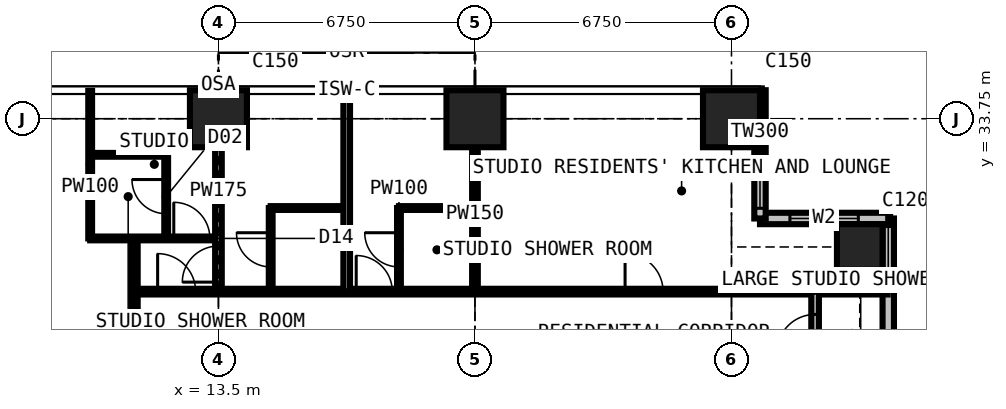
"""IFC4 building model, lengths in metres.
Left out: names, types, materials, properties, quantities, classifications, styles, units other than length and angle.
Written with IfcOpenShell. Run it as: python <this file> out.ifc"""

import sys

from ifc_helpers import new_model, si_unit, direction, frame, frame_2d, origin, origin_2d, place, context, subcontext, project, spatial, rectangle, extrude, element, fill, save


model = new_model("IFC4")
c1 = context("Model", 3, precision=1e-05, world=origin(), true_north=direction((0.0, 1.0)))
c2 = subcontext(c1, "Body", "Model", "MODEL_VIEW")
j1 = project(units=[si_unit("LENGTHUNIT", "METRE"), si_unit("PLANEANGLEUNIT", "RADIAN")], contexts=[c1])
p1 = place(None, origin())
s1 = spatial("IfcSite", under=j1, at=p1, CompositionType="ELEMENT")
p2 = place(p1, origin())
s2 = spatial("IfcBuilding", under=s1, at=p2, CompositionType="ELEMENT")
p3 = place(p2, frame((0.0, 0.0, 153.0)))
s3 = spatial("IfcBuildingStorey", under=s2, at=p3, CompositionType="ELEMENT", Elevation=153.0)
for number, where, z_axis, x_axis in (
    (1, (13.5, 33.75, 0.0), (0.0, 0.0, 1.0), (1.0, 0.0, 0.0)),
    (2, (20.25, 33.75, 0.0), (0.0, 0.0, 1.0), (1.0, 0.0, 0.0)),
    (3, (27.0, 33.75, 0.0), (0.0, 0.0, 1.0), (1.0, 0.0, 0.0)),
):
    element("IfcColumn", number, at=place(p3, frame(where, z_axis=z_axis, x_axis=x_axis)), inside=s3, PredefinedType="COLUMN", context=c2, shape_type="SweptSolid", body=[
        extrude(rectangle(XDim=1.5, YDim=1.5, at=origin_2d()), origin(), (0.0, 0.0, 1.0), 3.6),
    ])
p4 = place(p3, frame((30.375, 30.375, 0.0), z_axis=(0.0, 0.0, 1.0), x_axis=(1.0, 0.0, 0.0)))
e4 = element("IfcColumn", 4, at=p4, inside=s3, PredefinedType="COLUMN", context=c2, shape_type="SweptSolid", body=[
    extrude(rectangle(XDim=1.2, YDim=1.2, at=origin_2d()), origin(), (0.0, 0.0, 1.0), 3.6),
])
p5 = place(p3, frame((31.125, 27.75, 0.0), z_axis=(0.0, 0.0, 1.0), x_axis=(0.0, 1.0, 0.0)))
e5 = element("IfcWall", 5, at=p5, inside=s3, PredefinedType="SOLIDWALL", context=c2, shape_type="SweptSolid", body=[
    extrude(rectangle(XDim=3.375, YDim=0.3, at=frame_2d((1.688, 0.0))), origin(), (0.0, 0.0, 1.0), 3.375),
])
p6 = place(p5, frame((1.663, 0.0, 0.9)))
e6 = element("IfcOpeningElement", 6, at=p6, cuts=e5, PredefinedType="OPENING", context=c2, shape_type="SweptSolid", body=[
    extrude(rectangle(XDim=1.5, YDim=1.8, at=frame_2d((0.75, 0.9))), frame((0.0, 0.16, 0.0), z_axis=(0.0, -1.0, 0.0), x_axis=(1.0, 0.0, 0.0)), (0.0, 0.0, 1.0), 0.32),
])
p7 = place(p3, frame((31.125, 31.125, 0.0), z_axis=(0.0, 0.0, 1.0), x_axis=(-1.0, 0.0, 0.0)))
e7 = element("IfcWall", 7, at=p7, inside=s3, PredefinedType="SOLIDWALL", context=c2, shape_type="SweptSolid", body=[
    extrude(rectangle(XDim=3.375, YDim=0.3, at=frame_2d((1.688, 0.0))), origin(), (0.0, 0.0, 1.0), 3.375),
])
p8 = place(p7, frame((0.788, 0.0, 0.6)))
e8 = element("IfcOpeningElement", 8, at=p8, cuts=e7, PredefinedType="OPENING", context=c2, shape_type="SweptSolid", body=[
    extrude(rectangle(XDim=1.8, YDim=2.1, at=frame_2d((0.9, 1.05))), frame((0.0, 0.16, 0.0), z_axis=(0.0, -1.0, 0.0), x_axis=(1.0, 0.0, 0.0)), (0.0, 0.0, 1.0), 0.32),
])
p9 = place(p3, frame((27.75, 31.125, 0.0), z_axis=(0.0, 0.0, 1.0), x_axis=(0.0, 1.0, 0.0)))
e9 = element("IfcWall", 9, at=p9, inside=s3, PredefinedType="SOLIDWALL", context=c2, shape_type="SweptSolid", body=[
    extrude(rectangle(XDim=3.375, YDim=0.3, at=frame_2d((1.688, 0.0))), origin(), (0.0, 0.0, 1.0), 3.375),
])
p10 = place(p9, frame((0.268, 0.0, 0.9)))
e10 = element("IfcOpeningElement", 10, at=p10, cuts=e9, PredefinedType="OPENING", context=c2, shape_type="SweptSolid", body=[
    extrude(rectangle(XDim=1.5, YDim=1.8, at=frame_2d((0.75, 0.9))), frame((0.0, 0.16, 0.0), z_axis=(0.0, -1.0, 0.0), x_axis=(1.0, 0.0, 0.0)), (0.0, 0.0, 1.0), 0.32),
])
p11 = place(p3, frame((10.125, 30.6, 0.0), z_axis=(0.0, 0.0, 1.0), x_axis=(0.0, 1.0, 0.0)))
e11 = element("IfcWall", 11, at=p11, inside=s3, PredefinedType="PARTITIONING", context=c2, shape_type="SweptSolid", body=[
    extrude(rectangle(XDim=3.884, YDim=0.1, at=frame_2d((1.942, 0.0))), origin(), (0.0, 0.0, 1.0), 3.375),
])
p12 = place(p3, frame((10.125, 30.6, 0.0), z_axis=(0.0, 0.0, 1.0), x_axis=(1.0, 0.0, 0.0)))
e12 = element("IfcWall", 12, at=p12, inside=s3, PredefinedType="PARTITIONING", context=c2, shape_type="SweptSolid", body=[
    extrude(rectangle(XDim=3.375, YDim=0.1, at=frame_2d((1.688, 0.0))), origin(), (0.0, 0.0, 1.0), 3.375),
])
p13 = place(p12, frame((2.2, 0.0, 0.0)))
e13 = element("IfcOpeningElement", 13, at=p13, cuts=e12, PredefinedType="OPENING", context=c2, shape_type="SweptSolid", body=[
    extrude(rectangle(XDim=0.95, YDim=2.2, at=frame_2d((0.475, 1.1))), frame((0.0, 0.06, 0.0), z_axis=(0.0, -1.0, 0.0), x_axis=(1.0, 0.0, 0.0)), (0.0, 0.0, 1.0), 0.12),
])
p14 = place(p3, frame((10.125, 32.8, 0.0), z_axis=(0.0, 0.0, 1.0), x_axis=(1.0, 0.0, 0.0)))
e14 = element("IfcWall", 14, at=p14, inside=s3, PredefinedType="PARTITIONING", context=c2, shape_type="SweptSolid", body=[
    extrude(rectangle(XDim=2.0, YDim=0.1, at=frame_2d((1.0, 0.0))), origin(), (0.0, 0.0, 1.0), 3.375),
])
p15 = place(p3, frame((11.3, 11.3, 0.0), z_axis=(0.0, 0.0, 1.0), x_axis=(0.0, 1.0, 0.0)))
e15 = element("IfcWall", 15, at=p15, inside=s3, PredefinedType="PARTITIONING", context=c2, shape_type="SweptSolid", body=[
    extrude(rectangle(XDim=19.3, YDim=0.15, at=frame_2d((9.65, 0.0))), origin(), (0.0, 0.0, 1.0), 3.375),
])
p16 = place(p15, frame((13.525, 0.0, 0.0)))
e16 = element("IfcOpeningElement", 16, at=p16, cuts=e15, PredefinedType="OPENING", context=c2, shape_type="SweptSolid", body=[
    extrude(rectangle(XDim=1.0, YDim=2.2, at=frame_2d((0.5, 1.1))), frame((0.0, 0.085, 0.0), z_axis=(0.0, -1.0, 0.0), x_axis=(1.0, 0.0, 0.0)), (0.0, 0.0, 1.0), 0.17),
])
p17 = place(p15, frame((10.438, 0.0, 0.0)))
e17 = element("IfcOpeningElement", 17, at=p17, cuts=e15, PredefinedType="OPENING", context=c2, shape_type="SweptSolid", body=[
    extrude(rectangle(XDim=1.0, YDim=2.2, at=frame_2d((0.5, 1.1))), frame((0.0, 0.085, 0.0), z_axis=(0.0, -1.0, 0.0), x_axis=(1.0, 0.0, 0.0)), (0.0, 0.0, 1.0), 0.17),
])
p18 = place(p3, frame((11.3, 29.2, 0.0), z_axis=(0.0, 0.0, 1.0), x_axis=(1.0, 0.0, 0.0)))
e18 = element("IfcWall", 18, at=p18, inside=s3, PredefinedType="PARTITIONING", context=c2, shape_type="SweptSolid", body=[
    extrude(rectangle(XDim=19.809, YDim=0.15, at=frame_2d((9.904, 0.0))), origin(), (0.0, 0.0, 1.0), 3.375),
])
p19 = place(p18, frame((12.9, 0.0, 0.0)))
e19 = element("IfcOpeningElement", 19, at=p19, cuts=e18, PredefinedType="OPENING", context=c2, shape_type="SweptSolid", body=[
    extrude(rectangle(XDim=1.0, YDim=2.2, at=frame_2d((0.5, 1.1))), frame((0.0, 0.085, 0.0), z_axis=(0.0, -1.0, 0.0), x_axis=(1.0, 0.0, 0.0)), (0.0, 0.0, 1.0), 0.17),
])
p20 = place(p18, frame((5.825, 0.0, 0.0)))
e20 = element("IfcOpeningElement", 20, at=p20, cuts=e18, PredefinedType="OPENING", context=c2, shape_type="SweptSolid", body=[
    extrude(rectangle(XDim=0.95, YDim=2.2, at=frame_2d((0.475, 1.1))), frame((0.0, 0.085, 0.0), z_axis=(0.0, -1.0, 0.0), x_axis=(1.0, 0.0, 0.0)), (0.0, 0.0, 1.0), 0.17),
])
p21 = place(p18, frame((0.6, 0.0, 0.0)))
e21 = element("IfcOpeningElement", 21, at=p21, cuts=e18, PredefinedType="OPENING", context=c2, shape_type="SweptSolid", body=[
    extrude(rectangle(XDim=1.0, YDim=2.2, at=frame_2d((0.5, 1.1))), frame((0.0, 0.085, 0.0), z_axis=(0.0, -1.0, 0.0), x_axis=(1.0, 0.0, 0.0)), (0.0, 0.0, 1.0), 0.17),
])
p22 = place(p3, frame((12.125, 30.6, 0.0), z_axis=(0.0, 0.0, 1.0), x_axis=(0.0, 1.0, 0.0)))
e22 = element("IfcWall", 22, at=p22, inside=s3, PredefinedType="PARTITIONING", context=c2, shape_type="SweptSolid", body=[
    extrude(rectangle(XDim=2.2, YDim=0.1, at=frame_2d((1.1, 0.0))), origin(), (0.0, 0.0, 1.0), 3.375),
])
p23 = place(p22, frame((0.65, 0.0, 0.0)))
e23 = element("IfcOpeningElement", 23, at=p23, cuts=e22, PredefinedType="OPENING", context=c2, shape_type="SweptSolid", body=[
    extrude(rectangle(XDim=0.9, YDim=2.2, at=frame_2d((0.45, 1.1))), frame((0.0, 0.06, 0.0), z_axis=(0.0, -1.0, 0.0), x_axis=(1.0, 0.0, 0.0)), (0.0, 0.0, 1.0), 0.12),
])
p24 = place(p3, frame((13.5, 29.2, 0.0), z_axis=(0.0, 0.0, 1.0), x_axis=(0.0, 1.0, 0.0)))
e24 = element("IfcWall", 24, at=p24, inside=s3, PredefinedType="PARTITIONING", context=c2, shape_type="SweptSolid", body=[
    extrude(rectangle(XDim=5.284, YDim=0.175, at=frame_2d((2.642, 0.0))), origin(), (0.0, 0.0, 1.0), 2.61),
])
p25 = place(p24, frame((0.25, 0.0, 0.0)))
e25 = element("IfcOpeningElement", 25, at=p25, cuts=e24, PredefinedType="OPENING", context=c2, shape_type="SweptSolid", body=[
    extrude(rectangle(XDim=0.95, YDim=2.2, at=frame_2d((0.475, 1.1))), frame((0.0, 0.097, 0.0), z_axis=(0.0, -1.0, 0.0), x_axis=(1.0, 0.0, 0.0)), (0.0, 0.0, 1.0), 0.195),
])
p26 = place(p3, frame((14.875, 29.2, 0.0), z_axis=(0.0, 0.0, 1.0), x_axis=(0.0, 1.0, 0.0)))
e26 = element("IfcWall", 26, at=p26, inside=s3, PredefinedType="PARTITIONING", context=c2, shape_type="SweptSolid", body=[
    extrude(rectangle(XDim=2.2, YDim=0.1, at=frame_2d((1.1, 0.0))), origin(), (0.0, 0.0, 1.0), 3.375),
])
p27 = place(p26, frame((0.65, 0.0, 0.0)))
e27 = element("IfcOpeningElement", 27, at=p27, cuts=e26, PredefinedType="OPENING", context=c2, shape_type="SweptSolid", body=[
    extrude(rectangle(XDim=0.9, YDim=2.2, at=frame_2d((0.45, 1.1))), frame((0.0, 0.06, 0.0), z_axis=(0.0, -1.0, 0.0), x_axis=(1.0, 0.0, 0.0)), (0.0, 0.0, 1.0), 0.12),
])
p28 = place(p3, frame((14.875, 31.4, 0.0), z_axis=(0.0, 0.0, 1.0), x_axis=(1.0, 0.0, 0.0)))
e28 = element("IfcWall", 28, at=p28, inside=s3, PredefinedType="PARTITIONING", context=c2, shape_type="SweptSolid", body=[
    extrude(rectangle(XDim=2.0, YDim=0.1, at=frame_2d((1.0, 0.0))), origin(), (0.0, 0.0, 1.0), 3.375),
])
p29 = place(p3, frame((16.875, 29.2, 0.0), z_axis=(0.0, 0.0, 1.0), x_axis=(0.0, 1.0, 0.0)))
e29 = element("IfcWall", 29, at=p29, inside=s3, PredefinedType="PARTITIONING", context=c2, shape_type="SweptSolid", body=[
    extrude(rectangle(XDim=5.284, YDim=0.175, at=frame_2d((2.642, 0.0))), origin(), (0.0, 0.0, 1.0), 3.375),
])
p30 = place(p3, frame((18.25, 29.2, 0.0), z_axis=(0.0, 0.0, 1.0), x_axis=(0.0, 1.0, 0.0)))
e30 = element("IfcWall", 30, at=p30, inside=s3, PredefinedType="PARTITIONING", context=c2, shape_type="SweptSolid", body=[
    extrude(rectangle(XDim=2.2, YDim=0.1, at=frame_2d((1.1, 0.0))), origin(), (0.0, 0.0, 1.0), 3.375),
])
p31 = place(p30, frame((0.65, 0.0, 0.0)))
e31 = element("IfcOpeningElement", 31, at=p31, cuts=e30, PredefinedType="OPENING", context=c2, shape_type="SweptSolid", body=[
    extrude(rectangle(XDim=0.9, YDim=2.2, at=frame_2d((0.45, 1.1))), frame((0.0, 0.06, 0.0), z_axis=(0.0, -1.0, 0.0), x_axis=(1.0, 0.0, 0.0)), (0.0, 0.0, 1.0), 0.12),
])
p32 = place(p3, frame((18.25, 31.4, 0.0), z_axis=(0.0, 0.0, 1.0), x_axis=(1.0, 0.0, 0.0)))
e32 = element("IfcWall", 32, at=p32, inside=s3, PredefinedType="PARTITIONING", context=c2, shape_type="SweptSolid", body=[
    extrude(rectangle(XDim=2.0, YDim=0.1, at=frame_2d((1.0, 0.0))), origin(), (0.0, 0.0, 1.0), 3.375),
])
p33 = place(p3, frame((20.25, 29.2, 0.0), z_axis=(0.0, 0.0, 1.0), x_axis=(0.0, 1.0, 0.0)))
e33 = element("IfcWall", 33, at=p33, inside=s3, PredefinedType="PARTITIONING", context=c2, shape_type="SweptSolid", body=[
    extrude(rectangle(XDim=5.284, YDim=0.15, at=frame_2d((2.642, 0.0))), origin(), (0.0, 0.0, 1.0), 2.61),
])
p34 = place(p3, frame((29.2, 11.3, 0.0), z_axis=(0.0, 0.0, 1.0), x_axis=(0.0, 1.0, 0.0)))
e34 = element("IfcWall", 34, at=p34, inside=s3, PredefinedType="PARTITIONING", context=c2, shape_type="SweptSolid", body=[
    extrude(rectangle(XDim=17.9, YDim=0.2, at=frame_2d((8.95, 0.0))), origin(), (0.0, 0.0, 1.0), 3.375),
])
p35 = place(p34, frame((10.55, 0.0, 0.0)))
e35 = element("IfcOpeningElement", 35, at=p35, cuts=e34, PredefinedType="OPENING", context=c2, shape_type="SweptSolid", body=[
    extrude(rectangle(XDim=0.95, YDim=2.2, at=frame_2d((0.475, 1.1))), frame((0.0, 0.11, 0.0), z_axis=(0.0, -1.0, 0.0), x_axis=(1.0, 0.0, 0.0)), (0.0, 0.0, 1.0), 0.22),
])
p36 = place(p34, frame((5.775, 0.0, 0.0)))
e36 = element("IfcOpeningElement", 36, at=p36, cuts=e34, PredefinedType="OPENING", context=c2, shape_type="SweptSolid", body=[
    extrude(rectangle(XDim=0.95, YDim=2.2, at=frame_2d((0.475, 1.1))), frame((0.0, 0.11, 0.0), z_axis=(0.0, -1.0, 0.0), x_axis=(1.0, 0.0, 0.0)), (0.0, 0.0, 1.0), 0.22),
])
p37 = place(p34, frame((16.3, 0.0, 0.0)))
e37 = element("IfcOpeningElement", 37, at=p37, cuts=e34, PredefinedType="OPENING", context=c2, shape_type="SweptSolid", body=[
    extrude(rectangle(XDim=1.0, YDim=2.2, at=frame_2d((0.5, 1.1))), frame((0.0, 0.11, 0.0), z_axis=(0.0, -1.0, 0.0), x_axis=(1.0, 0.0, 0.0)), (0.0, 0.0, 1.0), 0.22),
])
p38 = place(p6, origin())
e38 = element("IfcWindow", 38, at=p38, inside=s3, PartitioningType="SINGLE_PANEL", PredefinedType="WINDOW", context=c2, shape_type="SweptSolid", body=[
    extrude(rectangle(XDim=1.5, YDim=1.8, at=frame_2d((0.75, 0.9))), frame((0.0, 0.03, 0.0), z_axis=(0.0, -1.0, 0.0), x_axis=(1.0, 0.0, 0.0)), (0.0, 0.0, 1.0), 0.06),
])
fill(e6, e38)
p39 = place(p8, origin())
e39 = element("IfcWindow", 39, at=p39, inside=s3, PartitioningType="SINGLE_PANEL", PredefinedType="WINDOW", context=c2, shape_type="SweptSolid", body=[
    extrude(rectangle(XDim=1.8, YDim=2.1, at=frame_2d((0.9, 1.05))), frame((0.0, 0.03, 0.0), z_axis=(0.0, -1.0, 0.0), x_axis=(1.0, 0.0, 0.0)), (0.0, 0.0, 1.0), 0.06),
])
fill(e8, e39)
p40 = place(p10, origin())
e40 = element("IfcWindow", 40, at=p40, inside=s3, PartitioningType="SINGLE_PANEL", PredefinedType="WINDOW", context=c2, shape_type="SweptSolid", body=[
    extrude(rectangle(XDim=1.5, YDim=1.8, at=frame_2d((0.75, 0.9))), frame((0.0, 0.03, 0.0), z_axis=(0.0, -1.0, 0.0), x_axis=(1.0, 0.0, 0.0)), (0.0, 0.0, 1.0), 0.06),
])
fill(e10, e40)
p41 = place(p37, origin())
e41 = element("IfcDoor", 41, at=p41, inside=s3, OperationType="SINGLE_SWING_LEFT", PredefinedType="DOOR", context=c2, shape_type="SweptSolid", body=[
    extrude(rectangle(XDim=1.0, YDim=2.2, at=frame_2d((0.5, 1.1))), frame((0.0, 0.025, 0.0), z_axis=(0.0, -1.0, 0.0), x_axis=(1.0, 0.0, 0.0)), (0.0, 0.0, 1.0), 0.05),
])
fill(e37, e41)
p42 = place(p19, origin())
e42 = element("IfcDoor", 42, at=p42, inside=s3, OperationType="SINGLE_SWING_LEFT", PredefinedType="DOOR", context=c2, shape_type="SweptSolid", body=[
    extrude(rectangle(XDim=1.0, YDim=2.2, at=frame_2d((0.5, 1.1))), frame((0.0, 0.025, 0.0), z_axis=(0.0, -1.0, 0.0), x_axis=(1.0, 0.0, 0.0)), (0.0, 0.0, 1.0), 0.05),
])
fill(e19, e42)
p43 = place(p13, origin())
e43 = element("IfcDoor", 43, at=p43, inside=s3, OperationType="SINGLE_SWING_LEFT", PredefinedType="DOOR", context=c2, shape_type="SweptSolid", body=[
    extrude(rectangle(XDim=0.95, YDim=2.2, at=frame_2d((0.475, 1.1))), frame((0.0, 0.025, 0.0), z_axis=(0.0, -1.0, 0.0), x_axis=(1.0, 0.0, 0.0)), (0.0, 0.0, 1.0), 0.05),
])
fill(e13, e43)
p44 = place(p23, origin())
e44 = element("IfcDoor", 44, at=p44, inside=s3, OperationType="SINGLE_SWING_RIGHT", PredefinedType="DOOR", context=c2, shape_type="SweptSolid", body=[
    extrude(rectangle(XDim=0.9, YDim=2.2, at=frame_2d((0.45, 1.1))), frame((0.0, 0.025, 0.0), z_axis=(0.0, -1.0, 0.0), x_axis=(1.0, 0.0, 0.0)), (0.0, 0.0, 1.0), 0.05),
])
fill(e23, e44)
p45 = place(p25, origin())
e45 = element("IfcDoor", 45, at=p45, inside=s3, OperationType="SINGLE_SWING_LEFT", PredefinedType="DOOR", context=c2, shape_type="SweptSolid", body=[
    extrude(rectangle(XDim=0.95, YDim=2.2, at=frame_2d((0.475, 1.1))), frame((0.0, 0.025, 0.0), z_axis=(0.0, -1.0, 0.0), x_axis=(1.0, 0.0, 0.0)), (0.0, 0.0, 1.0), 0.05),
])
fill(e25, e45)
p46 = place(p27, origin())
e46 = element("IfcDoor", 46, at=p46, inside=s3, OperationType="SINGLE_SWING_RIGHT", PredefinedType="DOOR", context=c2, shape_type="SweptSolid", body=[
    extrude(rectangle(XDim=0.9, YDim=2.2, at=frame_2d((0.45, 1.1))), frame((0.0, 0.025, 0.0), z_axis=(0.0, -1.0, 0.0), x_axis=(1.0, 0.0, 0.0)), (0.0, 0.0, 1.0), 0.05),
])
fill(e27, e46)
p47 = place(p20, origin())
e47 = element("IfcDoor", 47, at=p47, inside=s3, OperationType="SINGLE_SWING_LEFT", PredefinedType="DOOR", context=c2, shape_type="SweptSolid", body=[
    extrude(rectangle(XDim=0.95, YDim=2.2, at=frame_2d((0.475, 1.1))), frame((0.0, 0.025, 0.0), z_axis=(0.0, -1.0, 0.0), x_axis=(1.0, 0.0, 0.0)), (0.0, 0.0, 1.0), 0.05),
])
fill(e20, e47)
p48 = place(p31, origin())
e48 = element("IfcDoor", 48, at=p48, inside=s3, OperationType="SINGLE_SWING_RIGHT", PredefinedType="DOOR", context=c2, shape_type="SweptSolid", body=[
    extrude(rectangle(XDim=0.9, YDim=2.2, at=frame_2d((0.45, 1.1))), frame((0.0, 0.025, 0.0), z_axis=(0.0, -1.0, 0.0), x_axis=(1.0, 0.0, 0.0)), (0.0, 0.0, 1.0), 0.05),
])
fill(e31, e48)
p49 = place(p21, origin())
e49 = element("IfcDoor", 49, at=p49, inside=s3, OperationType="SINGLE_SWING_LEFT", PredefinedType="DOOR", context=c2, shape_type="SweptSolid", body=[
    extrude(rectangle(XDim=1.0, YDim=2.2, at=frame_2d((0.5, 1.1))), frame((0.0, 0.025, 0.0), z_axis=(0.0, -1.0, 0.0), x_axis=(1.0, 0.0, 0.0)), (0.0, 0.0, 1.0), 0.05),
])
fill(e21, e49)
save(model, sys.argv[1])
